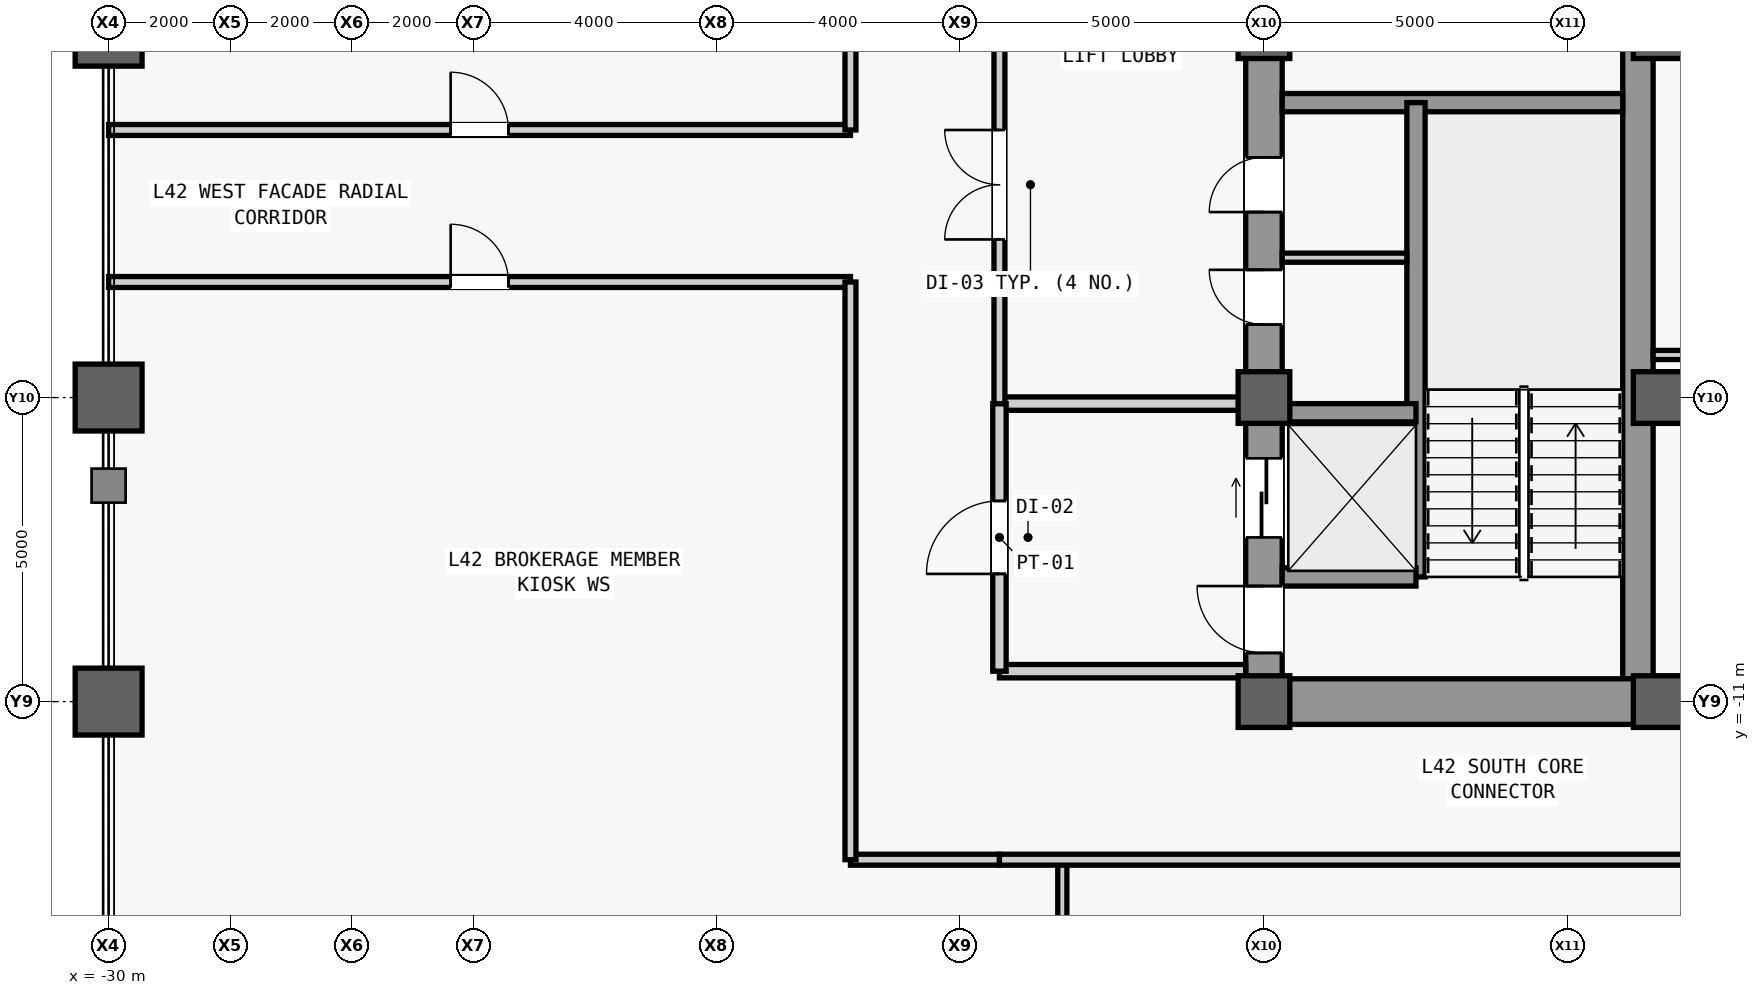
"""IFC4 building model, lengths in metres.
Left out: names, types, materials, properties, quantities, classifications, styles, units other than length and angle.
Written with IfcOpenShell. Run it as: python <this file> out.ifc"""

import sys

from ifc_helpers import new_model, si_unit, direction, frame, frame_2d, origin, origin_2d, place, context, subcontext, project, spatial, rectangle, hollow_rectangle, extrude, source, transform, mapped, element, fill, save


model = new_model("IFC4")
c1 = context("Model", 3, precision=1e-05, world=origin(), true_north=direction((0.0, 1.0)))
c2 = subcontext(c1, "Body", "Model", "MODEL_VIEW")
j1 = project(units=[si_unit("LENGTHUNIT", "METRE"), si_unit("PLANEANGLEUNIT", "RADIAN")], contexts=[c1])
p1 = place(None, origin())
s1 = spatial("IfcSite", under=j1, at=p1, CompositionType="ELEMENT")
p2 = place(p1, origin())
s2 = spatial("IfcBuilding", under=s1, at=p2, CompositionType="ELEMENT")
p3 = place(p2, frame((0.0, 0.0, 183.1)))
s3 = spatial("IfcBuildingStorey", under=s2, at=p3, CompositionType="ELEMENT", Elevation=183.1)
m1 = source(origin(), c2, "Body", "SweptSolid", [
    extrude(rectangle(XDim=22.0, YDim=0.6, at=frame_2d((11.0, 0.0))), origin(), (0.0, 0.0, 1.0), 3.78),
])
p4 = place(p3, frame((-11.0, -11.0, 0.0), z_axis=(0.0, 0.0, 1.0), x_axis=(0.0, 1.0, 0.0)))
e1 = element("IfcWall", 1, at=p4, inside=s3, PredefinedType="SHEAR", context=c2, shape_type="MappedRepresentation", body=[
    mapped(m1, transform((0.0, 0.0, 0.0), scale=1.0)),
])
m2 = source(origin(), c2, "Body", "SweptSolid", [
    extrude(rectangle(XDim=1.1, YDim=2.2, at=frame_2d((0.55, 1.1))), frame((0.0, 0.31, 0.0), z_axis=(0.0, -1.0, 0.0), x_axis=(1.0, 0.0, 0.0)), (0.0, 0.0, 1.0), 0.62),
])
p5 = place(p4, frame((0.8, 0.0, 0.0)))
e2 = element("IfcOpeningElement", 2, at=p5, cuts=e1, PredefinedType="OPENING", context=c2, shape_type="MappedRepresentation", body=[
    mapped(m2, transform((0.0, 0.0, 0.0), scale=1.0)),
])
p6 = place(p4, frame((12.5, 0.0, 0.0)))
e3 = element("IfcOpeningElement", 3, at=p6, cuts=e1, PredefinedType="OPENING", context=c2, shape_type="MappedRepresentation", body=[
    mapped(m2, transform((0.0, 0.0, 0.0), scale=1.0)),
])
m3 = source(origin(), c2, "Body", "SweptSolid", [
    extrude(rectangle(XDim=0.9, YDim=2.15, at=frame_2d((0.45, 1.075))), frame((0.0, 0.31, 0.0), z_axis=(0.0, -1.0, 0.0), x_axis=(1.0, 0.0, 0.0)), (0.0, 0.0, 1.0), 0.62),
])
p7 = place(p4, frame((6.2, 0.0, 0.0)))
e4 = element("IfcOpeningElement", 4, at=p7, cuts=e1, PredefinedType="OPENING", context=c2, shape_type="MappedRepresentation", body=[
    mapped(m3, transform((0.0, 0.0, 0.0), scale=1.0)),
])
p8 = place(p4, frame((8.05, 0.0, 0.0)))
e5 = element("IfcOpeningElement", 5, at=p8, cuts=e1, PredefinedType="OPENING", context=c2, shape_type="MappedRepresentation", body=[
    mapped(m3, transform((0.0, 0.0, 0.0), scale=1.0)),
])
m4 = source(origin(), c2, "Body", "SweptSolid", [
    extrude(rectangle(XDim=1.3, YDim=2.3, at=frame_2d((0.65, 1.15))), frame((0.0, 0.31, 0.0), z_axis=(0.0, -1.0, 0.0), x_axis=(1.0, 0.0, 0.0)), (0.0, 0.0, 1.0), 0.62),
])
p9 = place(p4, frame((2.7, 0.0, 0.0)))
e6 = element("IfcOpeningElement", 6, at=p9, cuts=e1, PredefinedType="OPENING", context=c2, shape_type="MappedRepresentation", body=[
    mapped(m4, transform((0.0, 0.0, 0.0), scale=1.0)),
])
m5 = source(origin(), c2, "Body", "SweptSolid", [
    extrude(rectangle(XDim=21.4, YDim=0.5, at=frame_2d((10.7, 0.0))), origin(), (0.0, 0.0, 1.0), 3.78),
])
p10 = place(p3, frame((-4.85, -10.7, 0.0), z_axis=(0.0, 0.0, 1.0), x_axis=(0.0, 1.0, 0.0)))
e7 = element("IfcWall", 7, at=p10, inside=s3, PredefinedType="SHEAR", context=c2, shape_type="MappedRepresentation", body=[
    mapped(m5, transform((0.0, 0.0, 0.0), scale=1.0)),
])
m6 = source(origin(), c2, "Body", "SweptSolid", [
    extrude(rectangle(XDim=5.85, YDim=0.75, at=frame_2d((2.925, 0.0))), origin(), (0.0, 0.0, 1.0), 3.78),
])
p11 = place(p3, frame((-10.7, -11.0, 0.0), z_axis=(0.0, 0.0, 1.0), x_axis=(1.0, 0.0, 0.0)))
e8 = element("IfcWall", 8, at=p11, inside=s3, PredefinedType="SHEAR", context=c2, shape_type="MappedRepresentation", body=[
    mapped(m6, transform((0.0, 0.0, 0.0), scale=1.0)),
])
m7 = source(origin(), c2, "Body", "SweptSolid", [
    extrude(rectangle(XDim=5.6, YDim=0.3, at=frame_2d((2.8, 0.0))), origin(), (0.0, 0.0, 1.0), 3.78),
])
p12 = place(p3, frame((-10.7, -1.15, 0.0), z_axis=(0.0, 0.0, 1.0), x_axis=(1.0, 0.0, 0.0)))
e9 = element("IfcWall", 9, at=p12, inside=s3, PredefinedType="SHEAR", context=c2, shape_type="MappedRepresentation", body=[
    mapped(m7, transform((0.0, 0.0, 0.0), scale=1.0)),
])
m8 = source(origin(), c2, "Body", "SweptSolid", [
    extrude(rectangle(XDim=9.2, YDim=0.5, at=frame_2d((4.6, 0.0))), origin(), (0.0, 0.0, 1.0), 3.78),
])
p13 = place(p3, frame((-4.6, -11.0, 0.0), z_axis=(0.0, 0.0, 1.0), x_axis=(1.0, 0.0, 0.0)))
e10 = element("IfcWall", 10, at=p13, inside=s3, PredefinedType="SHEAR", context=c2, shape_type="MappedRepresentation", body=[
    mapped(m8, transform((0.0, 0.0, 0.0), scale=1.0)),
])
m9 = source(origin(), c2, "Body", "SweptSolid", [
    extrude(rectangle(XDim=1.8, YDim=2.25, at=frame_2d((0.9, 1.125))), frame((0.0, 0.26, 0.0), z_axis=(0.0, -1.0, 0.0), x_axis=(1.0, 0.0, 0.0)), (0.0, 0.0, 1.0), 0.52),
])
p14 = place(p13, frame((3.7, 0.0, 0.0)))
e11 = element("IfcOpeningElement", 11, at=p14, cuts=e10, PredefinedType="OPENING", context=c2, shape_type="MappedRepresentation", body=[
    mapped(m9, transform((0.0, 0.0, 0.0), scale=1.0)),
])
m10 = source(origin(), c2, "Body", "SweptSolid", [
    extrude(hollow_rectangle(XDim=1.1, YDim=1.1, WallThickness=0.06, at=origin_2d()), origin(), (0.0, 0.0, 1.0), 4.0),
])
for number, where, z_axis, x_axis in (
    (12, (-30.0, -11.0, 0.0), (0.0, 0.0, 1.0), (1.0, 0.0, 0.0)),
    (13, (-30.0, -6.0, 0.0), (0.0, 0.0, 1.0), (1.0, 0.0, 0.0)),
    (14, (-30.0, 0.0, 0.0), (0.0, 0.0, 1.0), (1.0, 0.0, 0.0)),
):
    element("IfcColumn", number, at=place(p3, frame(where, z_axis=z_axis, x_axis=x_axis)), inside=s3, PredefinedType="COLUMN", context=c2, shape_type="MappedRepresentation", body=[
        mapped(m10, transform((0.0, 0.0, 0.0), scale=1.0)),
    ])
m11 = source(origin(), c2, "Body", "SweptSolid", [
    extrude(rectangle(XDim=0.85, YDim=0.85, at=origin_2d()), origin(), (0.0, 0.0, 1.0), 4.0),
])
for number, where, z_axis, x_axis in (
    (15, (-11.0, -11.0, 0.0), (0.0, 0.0, 1.0), (1.0, 0.0, 0.0)),
    (16, (-11.0, -6.0, 0.0), (0.0, 0.0, 1.0), (1.0, 0.0, 0.0)),
    (17, (-11.0, 0.0, 0.0), (0.0, 0.0, 1.0), (1.0, 0.0, 0.0)),
    (18, (-4.5, -11.0, 0.0), (0.0, 0.0, 1.0), (1.0, 0.0, 0.0)),
    (19, (-4.5, -6.0, 0.0), (0.0, 0.0, 1.0), (1.0, 0.0, 0.0)),
    (20, (-4.5, 0.0, 0.0), (0.0, 0.0, 1.0), (1.0, 0.0, 0.0)),
):
    element("IfcColumn", number, at=place(p3, frame(where, z_axis=z_axis, x_axis=x_axis)), inside=s3, PredefinedType="COLUMN", context=c2, shape_type="MappedRepresentation", body=[
        mapped(m11, transform((0.0, 0.0, 0.0), scale=1.0)),
    ])
m12 = source(origin(), c2, "Body", "SweptSolid", [
    extrude(rectangle(XDim=7.8, YDim=0.3, at=frame_2d((3.9, 0.0))), origin(), (0.0, 0.0, 1.0), 3.78),
])
p15 = place(p3, frame((-8.5, -8.95, 0.0), z_axis=(0.0, 0.0, 1.0), x_axis=(0.0, 1.0, 0.0)))
e21 = element("IfcWall", 21, at=p15, inside=s3, PredefinedType="SHEAR", context=c2, shape_type="MappedRepresentation", body=[
    mapped(m12, transform((0.0, 0.0, 0.0), scale=1.0)),
])
m13 = source(origin(), c2, "Body", "SweptSolid", [
    extrude(rectangle(XDim=2.2, YDim=0.3, at=frame_2d((1.1, 0.0))), origin(), (0.0, 0.0, 1.0), 3.78),
])
for number, where, z_axis, x_axis in (
    (22, (-10.7, -8.95, 0.0), (0.0, 0.0, 1.0), (1.0, 0.0, 0.0)),
    (23, (-10.7, -6.25, 0.0), (0.0, 0.0, 1.0), (1.0, 0.0, 0.0)),
):
    element("IfcWall", number, at=place(p3, frame(where, z_axis=z_axis, x_axis=x_axis)), inside=s3, PredefinedType="SHEAR", context=c2, shape_type="MappedRepresentation", body=[
        mapped(m13, transform((0.0, 0.0, 0.0), scale=1.0)),
    ])
m14 = source(origin(), c2, "Body", "SweptSolid", [
    extrude(rectangle(XDim=2.05, YDim=0.15, at=frame_2d((1.025, 0.0))), origin(), (0.0, 0.0, 1.0), 3.78),
])
p16 = place(p3, frame((-10.7, -3.7, 0.0), z_axis=(0.0, 0.0, 1.0), x_axis=(1.0, 0.0, 0.0)))
e24 = element("IfcWall", 24, at=p16, inside=s3, PredefinedType="PARTITIONING", context=c2, shape_type="MappedRepresentation", body=[
    mapped(m14, transform((0.0, 0.0, 0.0), scale=1.0)),
])
m15 = source(origin(), c2, "Body", "SweptSolid", [
    extrude(rectangle(XDim=4.05, YDim=0.22, at=frame_2d((2.025, 0.0))), origin(), (0.0, 0.0, 1.0), 3.78),
])
p17 = place(p3, frame((-15.35, -10.5, 0.0), z_axis=(0.0, 0.0, 1.0), x_axis=(1.0, 0.0, 0.0)))
e25 = element("IfcWall", 25, at=p17, inside=s3, PredefinedType="PARTITIONING", context=c2, shape_type="MappedRepresentation", body=[
    mapped(m15, transform((0.0, 0.0, 0.0), scale=1.0)),
])
m16 = source(origin(), c2, "Body", "SweptSolid", [
    extrude(rectangle(XDim=4.05, YDim=0.22, at=frame_2d((2.025, 0.0))), origin(), (0.0, 0.0, 1.0), 3.007),
])
p18 = place(p3, frame((-15.35, -6.1, 0.0), z_axis=(0.0, 0.0, 1.0), x_axis=(1.0, 0.0, 0.0)))
e26 = element("IfcWall", 26, at=p18, inside=s3, PredefinedType="PARTITIONING", context=c2, shape_type="MappedRepresentation", body=[
    mapped(m16, transform((0.0, 0.0, 0.0), scale=1.0)),
])
m17 = source(origin(), c2, "Body", "SweptSolid", [
    extrude(rectangle(XDim=4.4, YDim=0.22, at=frame_2d((2.2, 0.0))), origin(), (0.0, 0.0, 1.0), 3.78),
])
p19 = place(p3, frame((-15.35, -10.5, 0.0), z_axis=(0.0, 0.0, 1.0), x_axis=(0.0, 1.0, 0.0)))
e27 = element("IfcWall", 27, at=p19, inside=s3, PredefinedType="PARTITIONING", context=c2, shape_type="MappedRepresentation", body=[
    mapped(m17, transform((0.0, 0.0, 0.0), scale=1.0)),
])
m18 = source(origin(), c2, "Body", "SweptSolid", [
    extrude(rectangle(XDim=1.2, YDim=2.2, at=frame_2d((0.6, 1.1))), frame((0.0, 0.12, 0.0), z_axis=(0.0, -1.0, 0.0), x_axis=(1.0, 0.0, 0.0)), (0.0, 0.0, 1.0), 0.24),
])
p20 = place(p19, frame((1.6, 0.0, 0.0)))
e28 = element("IfcOpeningElement", 28, at=p20, cuts=e27, PredefinedType="OPENING", context=c2, shape_type="MappedRepresentation", body=[
    mapped(m18, transform((0.0, 0.0, 0.0), scale=1.0)),
])
m19 = source(origin(), c2, "Body", "SweptSolid", [
    extrude(rectangle(XDim=16.6, YDim=0.18, at=frame_2d((8.3, 0.0))), origin(), (0.0, 0.0, 1.0), 3.78),
])
p21 = place(p3, frame((-15.35, -6.1, 0.0), z_axis=(0.0, 0.0, 1.0), x_axis=(0.0, 1.0, 0.0)))
e29 = element("IfcWall", 29, at=p21, inside=s3, PredefinedType="PARTITIONING", context=c2, shape_type="MappedRepresentation", body=[
    mapped(m19, transform((0.0, 0.0, 0.0), scale=1.0)),
])
m20 = source(origin(), c2, "Body", "SweptSolid", [
    extrude(rectangle(XDim=1.8, YDim=2.25, at=frame_2d((0.9, 1.125))), frame((0.0, 0.1, 0.0), z_axis=(0.0, -1.0, 0.0), x_axis=(1.0, 0.0, 0.0)), (0.0, 0.0, 1.0), 0.2),
])
p22 = place(p21, frame((2.7, 0.0, 0.0)))
e30 = element("IfcOpeningElement", 30, at=p22, cuts=e29, PredefinedType="OPENING", context=c2, shape_type="MappedRepresentation", body=[
    mapped(m20, transform((0.0, 0.0, 0.0), scale=1.0)),
])
p23 = place(p21, frame((11.0, 0.0, 0.0)))
e31 = element("IfcOpeningElement", 31, at=p23, cuts=e29, PredefinedType="OPENING", context=c2, shape_type="MappedRepresentation", body=[
    mapped(m20, transform((0.0, 0.0, 0.0), scale=1.0)),
])
m21 = source(origin(), c2, "Body", "SweptSolid", [
    extrude(rectangle(XDim=3.45, YDim=0.15, at=frame_2d((1.725, 0.0))), origin(), (0.0, 0.0, 1.0), 3.78),
])
p24 = place(p3, frame((-4.6, -5.3, 0.0), z_axis=(0.0, 0.0, 1.0), x_axis=(1.0, 0.0, 0.0)))
e32 = element("IfcWall", 32, at=p24, inside=s3, PredefinedType="PARTITIONING", context=c2, shape_type="MappedRepresentation", body=[
    mapped(m21, transform((0.0, 0.0, 0.0), scale=1.0)),
])
m22 = source(origin(), c2, "Body", "SweptSolid", [
    extrude(rectangle(XDim=2.45, YDim=0.18, at=frame_2d((1.225, 0.0))), origin(), (0.0, 0.0, 1.0), 3.78),
])
p25 = place(p3, frame((-17.8, -13.6, 0.0), z_axis=(0.0, 0.0, 1.0), x_axis=(1.0, 0.0, 0.0)))
e33 = element("IfcWall", 33, at=p25, inside=s3, PredefinedType="PARTITIONING", context=c2, shape_type="MappedRepresentation", body=[
    mapped(m22, transform((0.0, 0.0, 0.0), scale=1.0)),
])
m23 = source(origin(), c2, "Body", "SweptSolid", [
    extrude(rectangle(XDim=16.4, YDim=0.15, at=frame_2d((8.2, 0.0))), origin(), (0.0, 0.0, 1.0), 3.78),
])
p26 = place(p3, frame((-14.316, -30.0, 0.0), z_axis=(0.0, 0.0, 1.0), x_axis=(0.0, 1.0, 0.0)))
e34 = element("IfcWall", 34, at=p26, inside=s3, PredefinedType="PARTITIONING", context=c2, shape_type="MappedRepresentation", body=[
    mapped(m23, transform((0.0, 0.0, 0.0), scale=1.0)),
])
m24 = source(origin(), c2, "Body", "SweptSolid", [
    extrude(rectangle(XDim=0.95, YDim=2.15, at=frame_2d((0.475, 1.075))), frame((0.0, 0.085, 0.0), z_axis=(0.0, -1.0, 0.0), x_axis=(1.0, 0.0, 0.0)), (0.0, 0.0, 1.0), 0.17),
])
p27 = place(p26, frame((11.825, 0.0, 0.0)))
e35 = element("IfcOpeningElement", 35, at=p27, cuts=e34, PredefinedType="OPENING", context=c2, shape_type="MappedRepresentation", body=[
    mapped(m24, transform((0.0, 0.0, 0.0), scale=1.0)),
])
m25 = source(origin(), c2, "Body", "SweptSolid", [
    extrude(rectangle(XDim=13.15, YDim=0.18, at=frame_2d((6.575, 0.0))), origin(), (0.0, 0.0, 1.0), 3.78),
])
p28 = place(p3, frame((-15.35, -13.6, 0.0), z_axis=(0.0, 0.0, 1.0), x_axis=(1.0, 0.0, 0.0)))
e36 = element("IfcWall", 36, at=p28, inside=s3, PredefinedType="PARTITIONING", context=c2, shape_type="MappedRepresentation", body=[
    mapped(m25, transform((0.0, 0.0, 0.0), scale=1.0)),
])
m26 = source(origin(), c2, "Body", "SweptSolid", [
    extrude(rectangle(XDim=12.2, YDim=0.18, at=frame_2d((6.1, 0.0))), origin(), (0.0, 0.0, 1.0), 3.78),
])
p29 = place(p3, frame((-30.0, -4.1, 0.0), z_axis=(0.0, 0.0, 1.0), x_axis=(1.0, 0.0, 0.0)))
e37 = element("IfcWall", 37, at=p29, inside=s3, PredefinedType="PARTITIONING", context=c2, shape_type="MappedRepresentation", body=[
    mapped(m26, transform((0.0, 0.0, 0.0), scale=1.0)),
])
m27 = source(origin(), c2, "Body", "SweptSolid", [
    extrude(rectangle(XDim=0.95, YDim=2.15, at=frame_2d((0.475, 1.075))), frame((0.0, 0.1, 0.0), z_axis=(0.0, -1.0, 0.0), x_axis=(1.0, 0.0, 0.0)), (0.0, 0.0, 1.0), 0.2),
])
p30 = place(p29, frame((5.625, 0.0, 0.0)))
e38 = element("IfcOpeningElement", 38, at=p30, cuts=e37, PredefinedType="OPENING", context=c2, shape_type="MappedRepresentation", body=[
    mapped(m27, transform((0.0, 0.0, 0.0), scale=1.0)),
])
m28 = source(origin(), c2, "Body", "SweptSolid", [
    extrude(rectangle(XDim=9.5, YDim=0.18, at=frame_2d((4.75, 0.0))), origin(), (0.0, 0.0, 1.0), 3.78),
])
p31 = place(p3, frame((-17.8, -13.6, 0.0), z_axis=(0.0, 0.0, 1.0), x_axis=(0.0, 1.0, 0.0)))
e39 = element("IfcWall", 39, at=p31, inside=s3, PredefinedType="PARTITIONING", context=c2, shape_type="MappedRepresentation", body=[
    mapped(m28, transform((0.0, 0.0, 0.0), scale=1.0)),
])
p32 = place(p3, frame((-30.0, -1.6, 0.0), z_axis=(0.0, 0.0, 1.0), x_axis=(1.0, 0.0, 0.0)))
e40 = element("IfcWall", 40, at=p32, inside=s3, PredefinedType="PARTITIONING", context=c2, shape_type="MappedRepresentation", body=[
    mapped(m26, transform((0.0, 0.0, 0.0), scale=1.0)),
])
p33 = place(p32, frame((5.625, 0.0, 0.0)))
e41 = element("IfcOpeningElement", 41, at=p33, cuts=e40, PredefinedType="OPENING", context=c2, shape_type="MappedRepresentation", body=[
    mapped(m27, transform((0.0, 0.0, 0.0), scale=1.0)),
])
m29 = source(origin(), c2, "Body", "SweptSolid", [
    extrude(rectangle(XDim=12.1, YDim=0.18, at=frame_2d((6.05, 0.0))), origin(), (0.0, 0.0, 1.0), 3.78),
])
p34 = place(p3, frame((-17.8, -1.6, 0.0), z_axis=(0.0, 0.0, 1.0), x_axis=(0.0, 1.0, 0.0)))
e42 = element("IfcWall", 42, at=p34, inside=s3, PredefinedType="PARTITIONING", context=c2, shape_type="MappedRepresentation", body=[
    mapped(m29, transform((0.0, 0.0, 0.0), scale=1.0)),
])
m30 = source(origin(), c2, "Body", "SweptSolid", [
    extrude(rectangle(XDim=1.1, YDim=2.2, at=frame_2d((0.55, 1.1))), frame((0.0, 0.025, 0.0), z_axis=(0.0, -1.0, 0.0), x_axis=(1.0, 0.0, 0.0)), (0.0, 0.0, 1.0), 0.05),
])
p35 = place(p5, origin())
e43 = element("IfcDoor", 43, at=p35, inside=s3, OperationType="SINGLE_SWING_RIGHT", PredefinedType="DOOR", context=c2, shape_type="MappedRepresentation", body=[
    mapped(m30, transform((0.0, 0.0, 0.0), scale=1.0)),
])
fill(e2, e43)
m31 = source(origin(), c2, "Body", "SweptSolid", [
    extrude(rectangle(XDim=0.9, YDim=2.15, at=frame_2d((0.45, 1.075))), frame((0.0, 0.025, 0.0), z_axis=(0.0, -1.0, 0.0), x_axis=(1.0, 0.0, 0.0)), (0.0, 0.0, 1.0), 0.05),
])
p36 = place(p7, origin())
e44 = element("IfcDoor", 44, at=p36, inside=s3, OperationType="SINGLE_SWING_RIGHT", PredefinedType="DOOR", context=c2, shape_type="MappedRepresentation", body=[
    mapped(m31, transform((0.0, 0.0, 0.0), scale=1.0)),
])
fill(e4, e44)
p37 = place(p8, origin())
e45 = element("IfcDoor", 45, at=p37, inside=s3, OperationType="SINGLE_SWING_LEFT", PredefinedType="DOOR", context=c2, shape_type="MappedRepresentation", body=[
    mapped(m31, transform((0.0, 0.0, 0.0), scale=1.0)),
])
fill(e5, e45)
m32 = source(origin(), c2, "Body", "SweptSolid", [
    extrude(rectangle(XDim=1.2, YDim=2.2, at=frame_2d((0.6, 1.1))), frame((0.0, 0.025, 0.0), z_axis=(0.0, -1.0, 0.0), x_axis=(1.0, 0.0, 0.0)), (0.0, 0.0, 1.0), 0.05),
])
p38 = place(p20, origin())
e46 = element("IfcDoor", 46, at=p38, inside=s3, OperationType="SINGLE_SWING_LEFT", PredefinedType="DOOR", context=c2, shape_type="MappedRepresentation", body=[
    mapped(m32, transform((0.0, 0.0, 0.0), scale=1.0)),
])
fill(e28, e46)
m33 = source(origin(), c2, "Body", "SweptSolid", [
    extrude(rectangle(XDim=1.8, YDim=2.25, at=frame_2d((0.9, 1.125))), frame((0.0, 0.025, 0.0), z_axis=(0.0, -1.0, 0.0), x_axis=(1.0, 0.0, 0.0)), (0.0, 0.0, 1.0), 0.05),
])
p39 = place(p22, origin())
e47 = element("IfcDoor", 47, at=p39, inside=s3, OperationType="SINGLE_SWING_LEFT", PredefinedType="DOOR", context=c2, shape_type="MappedRepresentation", body=[
    mapped(m33, transform((0.0, 0.0, 0.0), scale=1.0)),
])
fill(e30, e47)
m34 = source(origin(), c2, "Body", "SweptSolid", [
    extrude(rectangle(XDim=0.95, YDim=2.15, at=frame_2d((0.475, 1.075))), frame((0.0, 0.025, 0.0), z_axis=(0.0, -1.0, 0.0), x_axis=(1.0, 0.0, 0.0)), (0.0, 0.0, 1.0), 0.05),
])
p40 = place(p30, origin())
e48 = element("IfcDoor", 48, at=p40, inside=s3, OperationType="SINGLE_SWING_LEFT", PredefinedType="DOOR", context=c2, shape_type="MappedRepresentation", body=[
    mapped(m34, transform((0.0, 0.0, 0.0), scale=1.0)),
])
fill(e38, e48)
p41 = place(p33, origin())
e49 = element("IfcDoor", 49, at=p41, inside=s3, OperationType="SINGLE_SWING_LEFT", PredefinedType="DOOR", context=c2, shape_type="MappedRepresentation", body=[
    mapped(m34, transform((0.0, 0.0, 0.0), scale=1.0)),
])
fill(e41, e49)
m35 = source(origin(), c2, "Body", "SweptSolid", [
    extrude(rectangle(XDim=1.3, YDim=2.3, at=frame_2d((0.65, 1.15))), frame((0.0, 0.025, 0.0), z_axis=(0.0, -1.0, 0.0), x_axis=(1.0, 0.0, 0.0)), (0.0, 0.0, 1.0), 0.05),
])
p42 = place(p9, origin())
e50 = element("IfcDoor", 50, at=p42, inside=s3, OperationType="SLIDING_TO_LEFT", PredefinedType="DOOR", context=c2, shape_type="MappedRepresentation", body=[
    mapped(m35, transform((0.0, 0.0, 0.0), scale=1.0)),
])
fill(e6, e50)
save(model, sys.argv[1])
